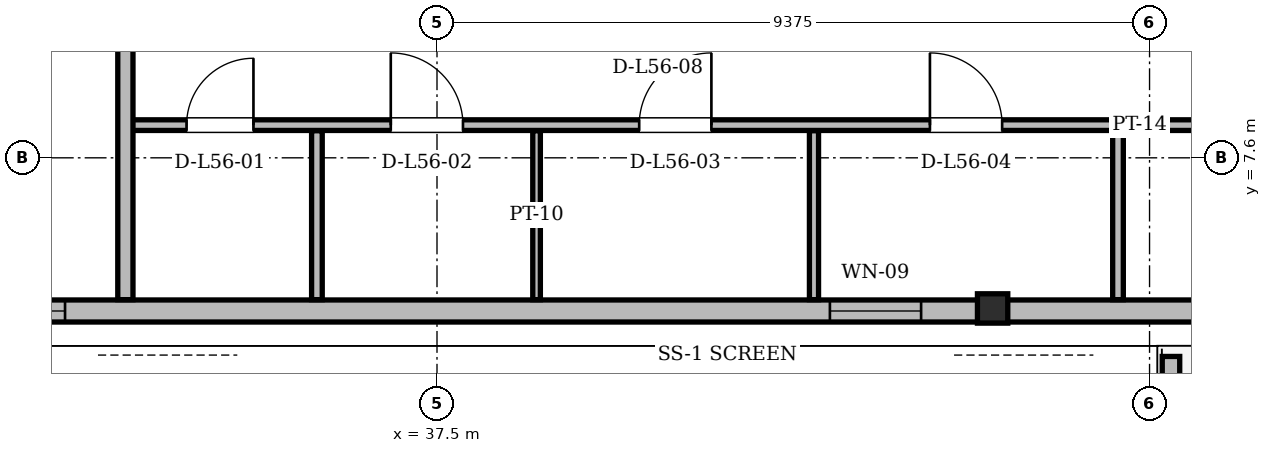
"""IFC4 building model, lengths in metres.
Left out: names, types, materials, properties, quantities, classifications, styles, units other than length and angle.
Written with IfcOpenShell. Run it as: python <this file> out.ifc"""

import sys

from ifc_helpers import new_model, si_unit, direction, frame, frame_2d, origin, origin_2d, place, context, subcontext, project, spatial, polyline, rectangle, i_section, outline, extrude, element, fill, save


model = new_model("IFC4")
c1 = context("Model", 3, precision=1e-05, world=origin(), true_north=direction((0.0, 1.0)))
c2 = subcontext(c1, "Body", "Model", "MODEL_VIEW")
j1 = project(units=[si_unit("LENGTHUNIT", "METRE"), si_unit("PLANEANGLEUNIT", "RADIAN")], contexts=[c1])
p1 = place(None, origin())
s1 = spatial("IfcSite", under=j1, at=p1, CompositionType="ELEMENT")
p2 = place(p1, origin())
s2 = spatial("IfcBuilding", under=s1, at=p2, CompositionType="ELEMENT")
p3 = place(p2, frame((0.0, 0.0, 212.7)))
s3 = spatial("IfcBuildingStorey", under=s2, at=p3, CompositionType="ELEMENT", Elevation=212.7)
p4 = place(p3, frame((44.805, 5.585, 0.005), z_axis=(0.003059014337, 0.018625998406, 0.999821841437), x_axis=(-0.986780496976, 0.162062490379, 0.0)))
e1 = element("IfcColumn", 1, at=p4, inside=s3, PredefinedType="COLUMN", context=c2, shape_type="SweptSolid", body=[
    extrude(i_section(OverallWidth=0.399, OverallDepth=0.386, WebThickness=0.021, FlangeThickness=0.033, at=origin_2d()), origin(), (0.0, 0.0, 1.0), 3.592),
])
p5 = place(p3, frame((19.239, 5.585, 0.0), z_axis=(0.0, 0.0, 1.0), x_axis=(1.0, 0.0, 0.0)))
e2 = element("IfcWall", 2, at=p5, inside=s3, PredefinedType="SOLIDWALL", context=c2, shape_type="SweptSolid", body=[
    extrude(rectangle(XDim=36.523, YDim=0.29, at=frame_2d((18.261, 0.0))), origin(), (0.0, 0.0, 1.0), 2.677),
])
p6 = place(p5, frame((8.034, 0.0, 0.0)))
e3 = element("IfcOpeningElement", 3, at=p6, cuts=e2, PredefinedType="OPENING", context=c2, shape_type="SweptSolid", body=[
    extrude(rectangle(XDim=1.5, YDim=2.2, at=frame_2d((0.75, 1.1))), frame((0.0, 0.145, 0.0), z_axis=(0.0, -1.0, 0.0), x_axis=(1.0, 0.0, 0.0)), (0.0, 0.0, 1.0), 0.29),
])
p7 = place(p5, frame((28.443, 0.0, 0.0)))
e4 = element("IfcOpeningElement", 4, at=p7, cuts=e2, PredefinedType="OPENING", context=c2, shape_type="SweptSolid", body=[
    extrude(rectangle(XDim=1.5, YDim=2.2, at=frame_2d((0.75, 1.1))), frame((0.0, 0.145, 0.0), z_axis=(0.0, -1.0, 0.0), x_axis=(1.0, 0.0, 0.0)), (0.0, 0.0, 1.0), 0.29),
])
p8 = place(p5, frame((23.431, 0.0, 0.85)))
e5 = element("IfcOpeningElement", 5, at=p8, cuts=e2, PredefinedType="OPENING", context=c2, shape_type="SweptSolid", body=[
    extrude(rectangle(XDim=1.2, YDim=1.48, at=frame_2d((0.6, 0.74))), frame((0.0, 0.145, 0.0), z_axis=(0.0, -1.0, 0.0), x_axis=(1.0, 0.0, 0.0)), (0.0, 0.0, 1.0), 0.29),
])
p9 = place(p5, frame((32.623, 0.0, 0.85)))
e6 = element("IfcOpeningElement", 6, at=p9, cuts=e2, PredefinedType="OPENING", context=c2, shape_type="SweptSolid", body=[
    extrude(rectangle(XDim=1.8, YDim=1.717, at=frame_2d((0.9, 0.858))), frame((0.0, 0.145, 0.0), z_axis=(0.0, -1.0, 0.0), x_axis=(1.0, 0.0, 0.0)), (0.0, 0.0, 1.0), 0.29),
])
p10 = place(p5, frame((3.316, 0.0, 0.85)))
e7 = element("IfcOpeningElement", 7, at=p10, cuts=e2, PredefinedType="OPENING", context=c2, shape_type="SweptSolid", body=[
    extrude(rectangle(XDim=1.6, YDim=1.7, at=frame_2d((0.8, 0.85))), frame((0.0, 0.145, 0.0), z_axis=(0.0, -1.0, 0.0), x_axis=(1.0, 0.0, 0.0)), (0.0, 0.0, 1.0), 0.29),
])
p11 = place(p5, frame((12.167, 0.0, 0.85)))
e8 = element("IfcOpeningElement", 8, at=p11, cuts=e2, PredefinedType="OPENING", context=c2, shape_type="SweptSolid", body=[
    extrude(rectangle(XDim=1.2, YDim=1.48, at=frame_2d((0.6, 0.74))), frame((0.0, 0.145, 0.0), z_axis=(0.0, -1.0, 0.0), x_axis=(1.0, 0.0, 0.0)), (0.0, 0.0, 1.0), 0.29),
])
p12 = place(p3, frame((47.157, 4.987, 0.0), z_axis=(0.0, 0.0, 1.0), x_axis=(0.0, -1.0, 0.0)))
e9 = element("IfcWall", 9, at=p12, inside=s3, PredefinedType="PARAPET", context=c2, shape_type="SweptSolid", body=[
    extrude(outline(polyline([(0.0, 0.0), (2.042, 0.0), (2.042, 1.1), (0.0, 1.32), (0.0, 0.0)])), frame((0.0, 0.115, 0.0), z_axis=(0.0, -1.0, 0.0), x_axis=(1.0, 0.0, 0.0)), (0.0, 0.0, 1.0), 0.23),
])
p13 = place(p3, frame((33.35, 8.03, 0.0), z_axis=(0.0, 0.0, 1.0), x_axis=(1.0, 0.0, 0.0)))
e10 = element("IfcWall", 10, at=p13, inside=s3, PredefinedType="PARTITIONING", context=c2, shape_type="SweptSolid", body=[
    extrude(rectangle(XDim=23.651, YDim=0.14, at=frame_2d((11.826, 0.0))), origin(), (0.0, 0.0, 1.0), 2.913),
])
p14 = place(p13, frame((0.855, 0.0, 0.0)))
e11 = element("IfcOpeningElement", 11, at=p14, cuts=e10, PredefinedType="OPENING", context=c2, shape_type="SweptSolid", body=[
    extrude(rectangle(XDim=0.88, YDim=2.08, at=frame_2d((0.44, 1.04))), frame((0.0, 0.07, 0.0), z_axis=(0.0, -1.0, 0.0), x_axis=(1.0, 0.0, 0.0)), (0.0, 0.0, 1.0), 0.14),
])
p15 = place(p13, frame((3.542, 0.0, 0.0)))
e12 = element("IfcOpeningElement", 12, at=p15, cuts=e10, PredefinedType="OPENING", context=c2, shape_type="SweptSolid", body=[
    extrude(rectangle(XDim=0.95, YDim=2.1, at=frame_2d((0.475, 1.05))), frame((0.0, 0.07, 0.0), z_axis=(0.0, -1.0, 0.0), x_axis=(1.0, 0.0, 0.0)), (0.0, 0.0, 1.0), 0.14),
])
p16 = place(p13, frame((6.81, 0.0, 0.0)))
e13 = element("IfcOpeningElement", 13, at=p16, cuts=e10, PredefinedType="OPENING", context=c2, shape_type="SweptSolid", body=[
    extrude(rectangle(XDim=0.95, YDim=2.1, at=frame_2d((0.475, 1.05))), frame((0.0, 0.07, 0.0), z_axis=(0.0, -1.0, 0.0), x_axis=(1.0, 0.0, 0.0)), (0.0, 0.0, 1.0), 0.14),
])
p17 = place(p13, frame((10.635, 0.0, 0.0)))
e14 = element("IfcOpeningElement", 14, at=p17, cuts=e10, PredefinedType="OPENING", context=c2, shape_type="SweptSolid", body=[
    extrude(rectangle(XDim=0.95, YDim=2.1, at=frame_2d((0.475, 1.05))), frame((0.0, 0.07, 0.0), z_axis=(0.0, -1.0, 0.0), x_axis=(1.0, 0.0, 0.0)), (0.0, 0.0, 1.0), 0.14),
])
p18 = place(p13, frame((15.205, 0.0, 0.0)))
e15 = element("IfcOpeningElement", 15, at=p18, cuts=e10, PredefinedType="OPENING", context=c2, shape_type="SweptSolid", body=[
    extrude(rectangle(XDim=0.92, YDim=2.12, at=frame_2d((0.46, 1.06))), frame((0.0, 0.07, 0.0), z_axis=(0.0, -1.0, 0.0), x_axis=(1.0, 0.0, 0.0)), (0.0, 0.0, 1.0), 0.14),
])
p19 = place(p13, frame((20.487, 0.0, 0.0)))
e16 = element("IfcOpeningElement", 16, at=p19, cuts=e10, PredefinedType="OPENING", context=c2, shape_type="SweptSolid", body=[
    extrude(rectangle(XDim=0.92, YDim=2.12, at=frame_2d((0.46, 1.06))), frame((0.0, 0.07, 0.0), z_axis=(0.0, -1.0, 0.0), x_axis=(1.0, 0.0, 0.0)), (0.0, 0.0, 1.0), 0.14),
])
p20 = place(p3, frame((33.4, 5.734, 0.0), z_axis=(0.0, 0.0, 1.0), x_axis=(0.0, 1.0, 0.0)))
e17 = element("IfcWall", 17, at=p20, inside=s3, PredefinedType="PARTITIONING", context=c2, shape_type="SweptSolid", body=[
    extrude(rectangle(XDim=3.462, YDim=0.2, at=frame_2d((1.731, 0.0))), origin(), (0.0, 0.0, 1.0), 3.38),
])
p21 = place(p3, frame((35.92, 5.734, 0.0), z_axis=(0.0, 0.0, 1.0), x_axis=(0.0, 1.0, 0.0)))
e18 = element("IfcWall", 18, at=p21, inside=s3, PredefinedType="PARTITIONING", context=c2, shape_type="SweptSolid", body=[
    extrude(rectangle(XDim=2.222, YDim=0.14, at=frame_2d((1.111, 0.0))), origin(), (0.0, 0.0, 1.0), 3.38),
])
p22 = place(p3, frame((38.81, 5.734, 0.0), z_axis=(0.0, 0.0, 1.0), x_axis=(0.0, 1.0, 0.0)))
e19 = element("IfcWall", 19, at=p22, inside=s3, PredefinedType="PARTITIONING", context=c2, shape_type="SweptSolid", body=[
    extrude(rectangle(XDim=2.222, YDim=0.1, at=frame_2d((1.111, 0.0))), origin(), (0.0, 0.0, 1.0), 3.38),
])
p23 = place(p3, frame((42.46, 5.734, 0.0), z_axis=(0.0, 0.0, 1.0), x_axis=(0.0, 1.0, 0.0)))
e20 = element("IfcWall", 20, at=p23, inside=s3, PredefinedType="PARTITIONING", context=c2, shape_type="SweptSolid", body=[
    extrude(rectangle(XDim=2.222, YDim=0.12, at=frame_2d((1.111, 0.0))), origin(), (0.0, 0.0, 1.0), 3.38),
])
p24 = place(p3, frame((46.46, 5.734, 0.0), z_axis=(0.0, 0.0, 1.0), x_axis=(0.0, 1.0, 0.0)))
e21 = element("IfcWall", 21, at=p24, inside=s3, PredefinedType="PARTITIONING", context=c2, shape_type="SweptSolid", body=[
    extrude(rectangle(XDim=2.222, YDim=0.14, at=frame_2d((1.111, 0.0))), origin(), (0.0, 0.0, 1.0), 3.38),
])
p25 = place(p8, origin())
e22 = element("IfcWindow", 22, at=p25, inside=s3, PartitioningType="SINGLE_PANEL", PredefinedType="WINDOW", context=c2, shape_type="SweptSolid", body=[
    extrude(rectangle(XDim=1.2, YDim=1.48, at=frame_2d((0.6, 0.74))), frame((0.0, 0.03, 0.0), z_axis=(0.0, -1.0, 0.0), x_axis=(1.0, 0.0, 0.0)), (0.0, 0.0, 1.0), 0.06),
])
fill(e5, e22)
p26 = place(p11, origin())
e23 = element("IfcWindow", 23, at=p26, inside=s3, PartitioningType="SINGLE_PANEL", PredefinedType="WINDOW", context=c2, shape_type="SweptSolid", body=[
    extrude(rectangle(XDim=1.2, YDim=1.48, at=frame_2d((0.6, 0.74))), frame((0.0, 0.03, 0.0), z_axis=(0.0, -1.0, 0.0), x_axis=(1.0, 0.0, 0.0)), (0.0, 0.0, 1.0), 0.06),
])
fill(e8, e23)
p27 = place(p14, origin())
e24 = element("IfcDoor", 24, at=p27, inside=s3, OperationType="SINGLE_SWING_RIGHT", PredefinedType="DOOR", context=c2, shape_type="SweptSolid", body=[
    extrude(rectangle(XDim=0.88, YDim=2.08, at=frame_2d((0.44, 1.04))), frame((0.0, 0.025, 0.0), z_axis=(0.0, -1.0, 0.0), x_axis=(1.0, 0.0, 0.0)), (0.0, 0.0, 1.0), 0.05),
])
fill(e11, e24)
p28 = place(p15, origin())
e25 = element("IfcDoor", 25, at=p28, inside=s3, OperationType="SINGLE_SWING_LEFT", PredefinedType="DOOR", context=c2, shape_type="SweptSolid", body=[
    extrude(rectangle(XDim=0.95, YDim=2.1, at=frame_2d((0.475, 1.05))), frame((0.0, 0.025, 0.0), z_axis=(0.0, -1.0, 0.0), x_axis=(1.0, 0.0, 0.0)), (0.0, 0.0, 1.0), 0.05),
])
fill(e12, e25)
p29 = place(p16, origin())
e26 = element("IfcDoor", 26, at=p29, inside=s3, OperationType="SINGLE_SWING_RIGHT", PredefinedType="DOOR", context=c2, shape_type="SweptSolid", body=[
    extrude(rectangle(XDim=0.95, YDim=2.1, at=frame_2d((0.475, 1.05))), frame((0.0, 0.025, 0.0), z_axis=(0.0, -1.0, 0.0), x_axis=(1.0, 0.0, 0.0)), (0.0, 0.0, 1.0), 0.05),
])
fill(e13, e26)
p30 = place(p17, origin())
e27 = element("IfcDoor", 27, at=p30, inside=s3, OperationType="SINGLE_SWING_LEFT", PredefinedType="DOOR", context=c2, shape_type="SweptSolid", body=[
    extrude(rectangle(XDim=0.95, YDim=2.1, at=frame_2d((0.475, 1.05))), frame((0.0, 0.025, 0.0), z_axis=(0.0, -1.0, 0.0), x_axis=(1.0, 0.0, 0.0)), (0.0, 0.0, 1.0), 0.05),
])
fill(e14, e27)
save(model, sys.argv[1])
